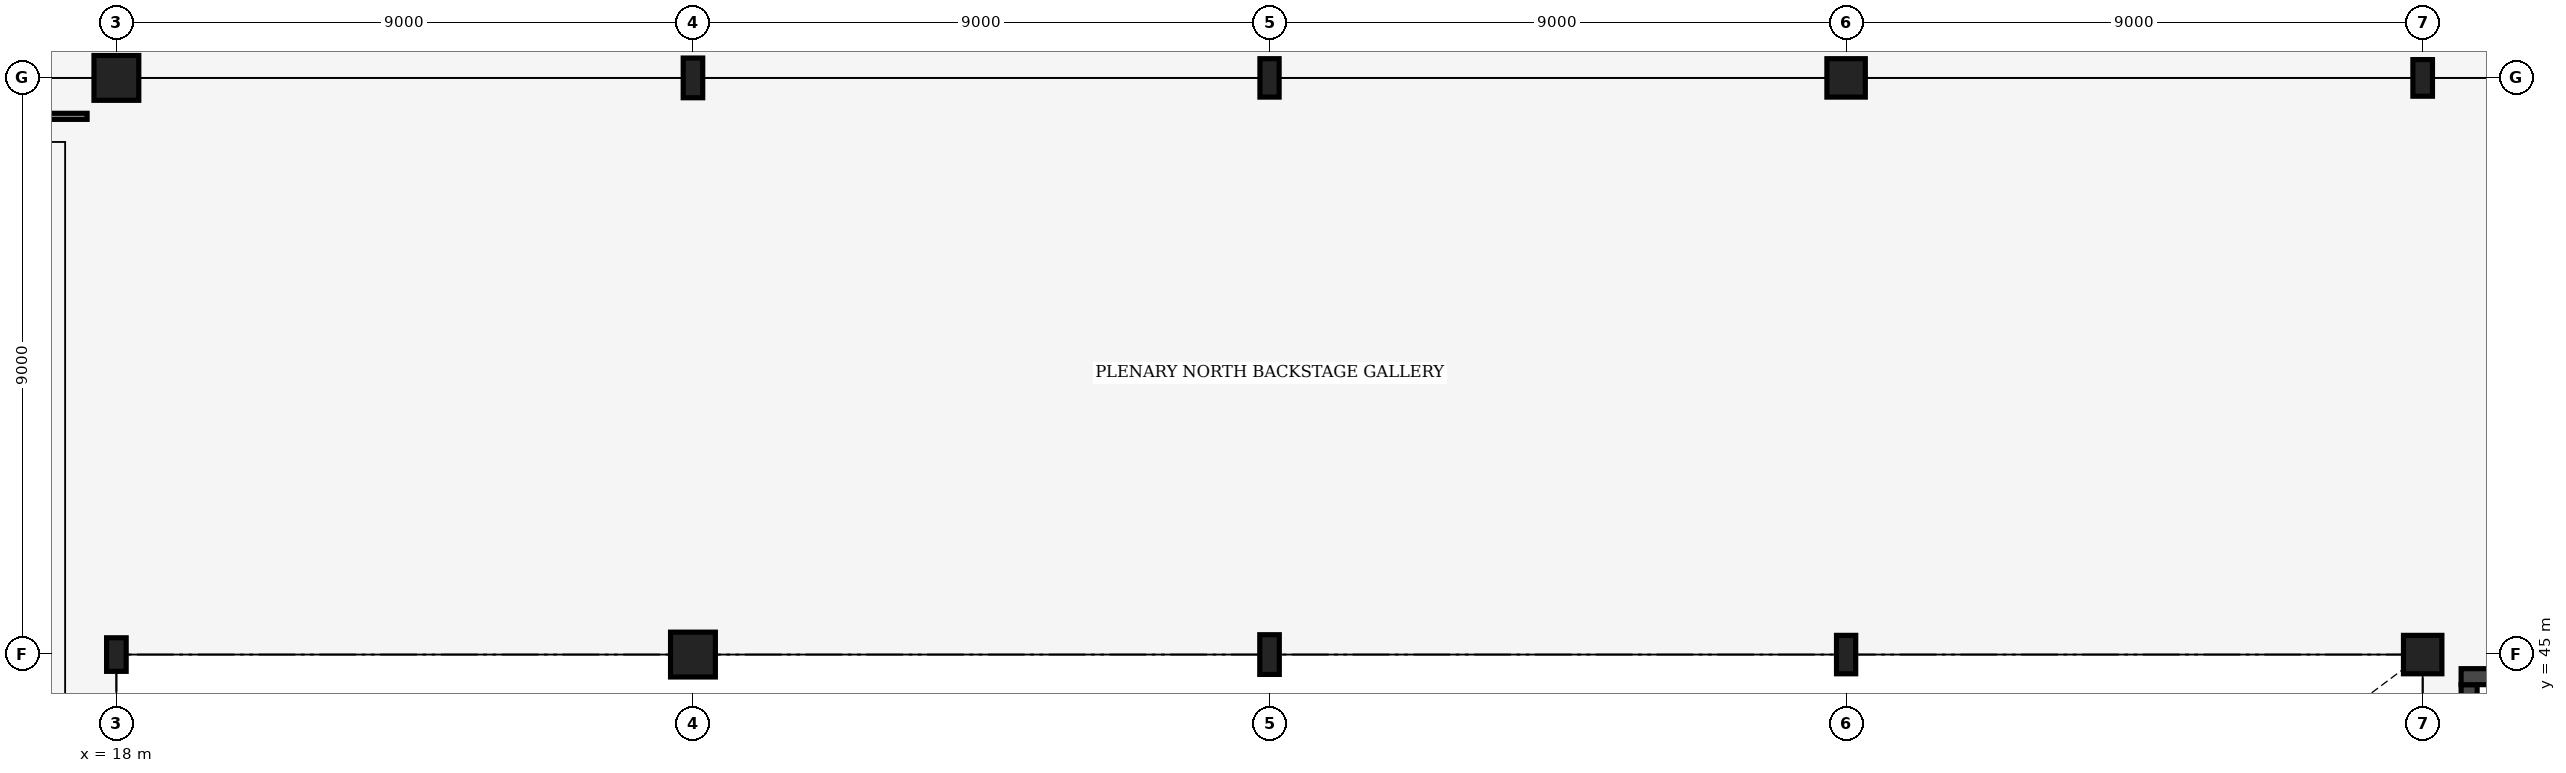
"""IFC4 building model, lengths in metres.
Left out: names, types, materials, properties, quantities, classifications, styles, units other than length and angle.
Written with IfcOpenShell. Run it as: python <this file> out.ifc"""

import sys

from ifc_helpers import new_model, si_unit, direction, frame, frame_2d, origin, origin_2d, place, context, subcontext, project, spatial, rectangle, i_section, extrude, element, save


model = new_model("IFC4")
c1 = context("Model", 3, precision=1e-05, world=origin(), true_north=direction((0.0, 1.0)))
c2 = subcontext(c1, "Body", "Model", "MODEL_VIEW")
j1 = project(units=[si_unit("LENGTHUNIT", "METRE"), si_unit("PLANEANGLEUNIT", "RADIAN")], contexts=[c1])
p1 = place(None, origin())
s1 = spatial("IfcSite", under=j1, at=p1, CompositionType="ELEMENT")
p2 = place(p1, origin())
s2 = spatial("IfcBuilding", under=s1, at=p2, CompositionType="ELEMENT")
p3 = place(p2, frame((0.0, 0.0, 6.0)))
s3 = spatial("IfcBuildingStorey", under=s2, at=p3, CompositionType="ELEMENT", Elevation=6.0)
p4 = place(p3, frame((18.0, 45.0, 0.0), z_axis=(0.0, 0.0, 1.0), x_axis=(1.0, 0.0, 0.0)))
e1 = element("IfcColumn", 1, at=p4, inside=s3, PredefinedType="COLUMN", context=c2, shape_type="SweptSolid", body=[
    extrude(i_section(OverallWidth=0.306, OverallDepth=0.524, WebThickness=0.021, FlangeThickness=0.04, FilletRadius=0.027, at=origin_2d()), origin(), (0.0, 0.0, 1.0), 6.0),
])
for number, where, z_axis, x_axis in (
    (2, (18.0, 54.0, 0.0), (0.0, 0.0, 1.0), (1.0, 0.0, 0.0)),
    (3, (27.0, 45.0, 0.0), (0.0, 0.0, 1.0), (1.0, 0.0, 0.0)),
):
    element("IfcColumn", number, at=place(p3, frame(where, z_axis=z_axis, x_axis=x_axis)), inside=s3, PredefinedType="COLUMN", context=c2, shape_type="SweptSolid", body=[
        extrude(rectangle(XDim=0.7, YDim=0.7, at=origin_2d()), origin(), (0.0, 0.0, 1.0), 6.0),
    ])
for number, where, z_axis, x_axis in (
    (4, (27.0, 54.0, 0.0), (0.0, 0.0, 1.0), (1.0, 0.0, 0.0)),
    (5, (36.0, 45.0, 0.0), (0.0, 0.0, 1.0), (1.0, 0.0, 0.0)),
):
    element("IfcColumn", number, at=place(p3, frame(where, z_axis=z_axis, x_axis=x_axis)), inside=s3, PredefinedType="COLUMN", context=c2, shape_type="SweptSolid", body=[
        extrude(i_section(OverallWidth=0.305, OverallDepth=0.62, WebThickness=0.021, FlangeThickness=0.04, FilletRadius=0.027, at=origin_2d()), origin(), (0.0, 0.0, 1.0), 6.0),
    ])
for number, where, z_axis, x_axis in (
    (6, (36.0, 54.0, 0.0), (0.0, 0.0, 1.0), (1.0, 0.0, 0.0)),
    (7, (45.0, 45.0, 0.0), (0.0, 0.0, 1.0), (1.0, 0.0, 0.0)),
):
    element("IfcColumn", number, at=place(p3, frame(where, z_axis=z_axis, x_axis=x_axis)), inside=s3, PredefinedType="COLUMN", context=c2, shape_type="SweptSolid", body=[
        extrude(i_section(OverallWidth=0.3, OverallDepth=0.6, WebThickness=0.015, FlangeThickness=0.03, FilletRadius=0.027, at=origin_2d()), origin(), (0.0, 0.0, 1.0), 6.0),
    ])
for number, where, z_axis, x_axis in (
    (8, (45.0, 54.0, 0.0), (0.0, 0.0, 1.0), (1.0, 0.0, 0.0)),
    (9, (54.0, 45.0, 0.0), (0.0, 0.0, 1.0), (1.0, 0.0, 0.0)),
):
    element("IfcColumn", number, at=place(p3, frame(where, z_axis=z_axis, x_axis=x_axis)), inside=s3, PredefinedType="COLUMN", context=c2, shape_type="SweptSolid", body=[
        extrude(rectangle(XDim=0.6, YDim=0.6, at=origin_2d()), origin(), (0.0, 0.0, 1.0), 6.0),
    ])
p5 = place(p3, frame((54.0, 54.0, 0.0), z_axis=(0.0, 0.0, 1.0), x_axis=(1.0, 0.0, 0.0)))
e10 = element("IfcColumn", 10, at=p5, inside=s3, PredefinedType="COLUMN", context=c2, shape_type="SweptSolid", body=[
    extrude(i_section(OverallWidth=0.306, OverallDepth=0.572, WebThickness=0.021, FlangeThickness=0.04, FilletRadius=0.027, at=origin_2d()), origin(), (0.0, 0.0, 1.0), 6.0),
])
p6 = place(p3, frame((54.725, 36.47, 0.0), z_axis=(0.0, 0.0, 1.0), x_axis=(0.0, 1.0, 0.0)))
e11 = element("IfcWall", 11, at=p6, inside=s3, PredefinedType="SHEAR", context=c2, shape_type="SweptSolid", body=[
    extrude(rectangle(XDim=8.06, YDim=0.25, at=frame_2d((4.03, 0.0))), origin(), (0.0, 0.0, 1.0), 5.7),
])
p7 = place(p6, frame((1.15, 0.0, 0.0)))
e12 = element("IfcOpeningElement", 12, at=p7, cuts=e11, PredefinedType="OPENING", context=c2, shape_type="SweptSolid", body=[
    extrude(rectangle(XDim=1.6, YDim=2.2, at=frame_2d((0.8, 1.1))), frame((0.0, 0.135, 0.0), z_axis=(0.0, -1.0, 0.0), x_axis=(1.0, 0.0, 0.0)), (0.0, 0.0, 1.0), 0.27),
])
p8 = place(p3, frame((54.6, 44.655, 0.0), z_axis=(0.0, 0.0, 1.0), x_axis=(1.0, 0.0, 0.0)))
e13 = element("IfcWall", 13, at=p8, inside=s3, PredefinedType="SHEAR", context=c2, shape_type="SweptSolid", body=[
    extrude(rectangle(XDim=7.8, YDim=0.25, at=frame_2d((3.9, 0.0))), origin(), (0.0, 0.0, 1.0), 5.7),
])
p9 = place(p3, frame((0.657, 53.4, 0.0), z_axis=(0.0, 0.0, 1.0), x_axis=(1.0, 0.0, 0.0)))
e14 = element("IfcWall", 14, at=p9, inside=s3, PredefinedType="PARTITIONING", context=c2, shape_type="SweptSolid", body=[
    extrude(rectangle(XDim=16.886, YDim=0.095, at=frame_2d((8.443, 0.0))), origin(), (0.0, 0.0, 1.0), 4.85),
])
save(model, sys.argv[1])
